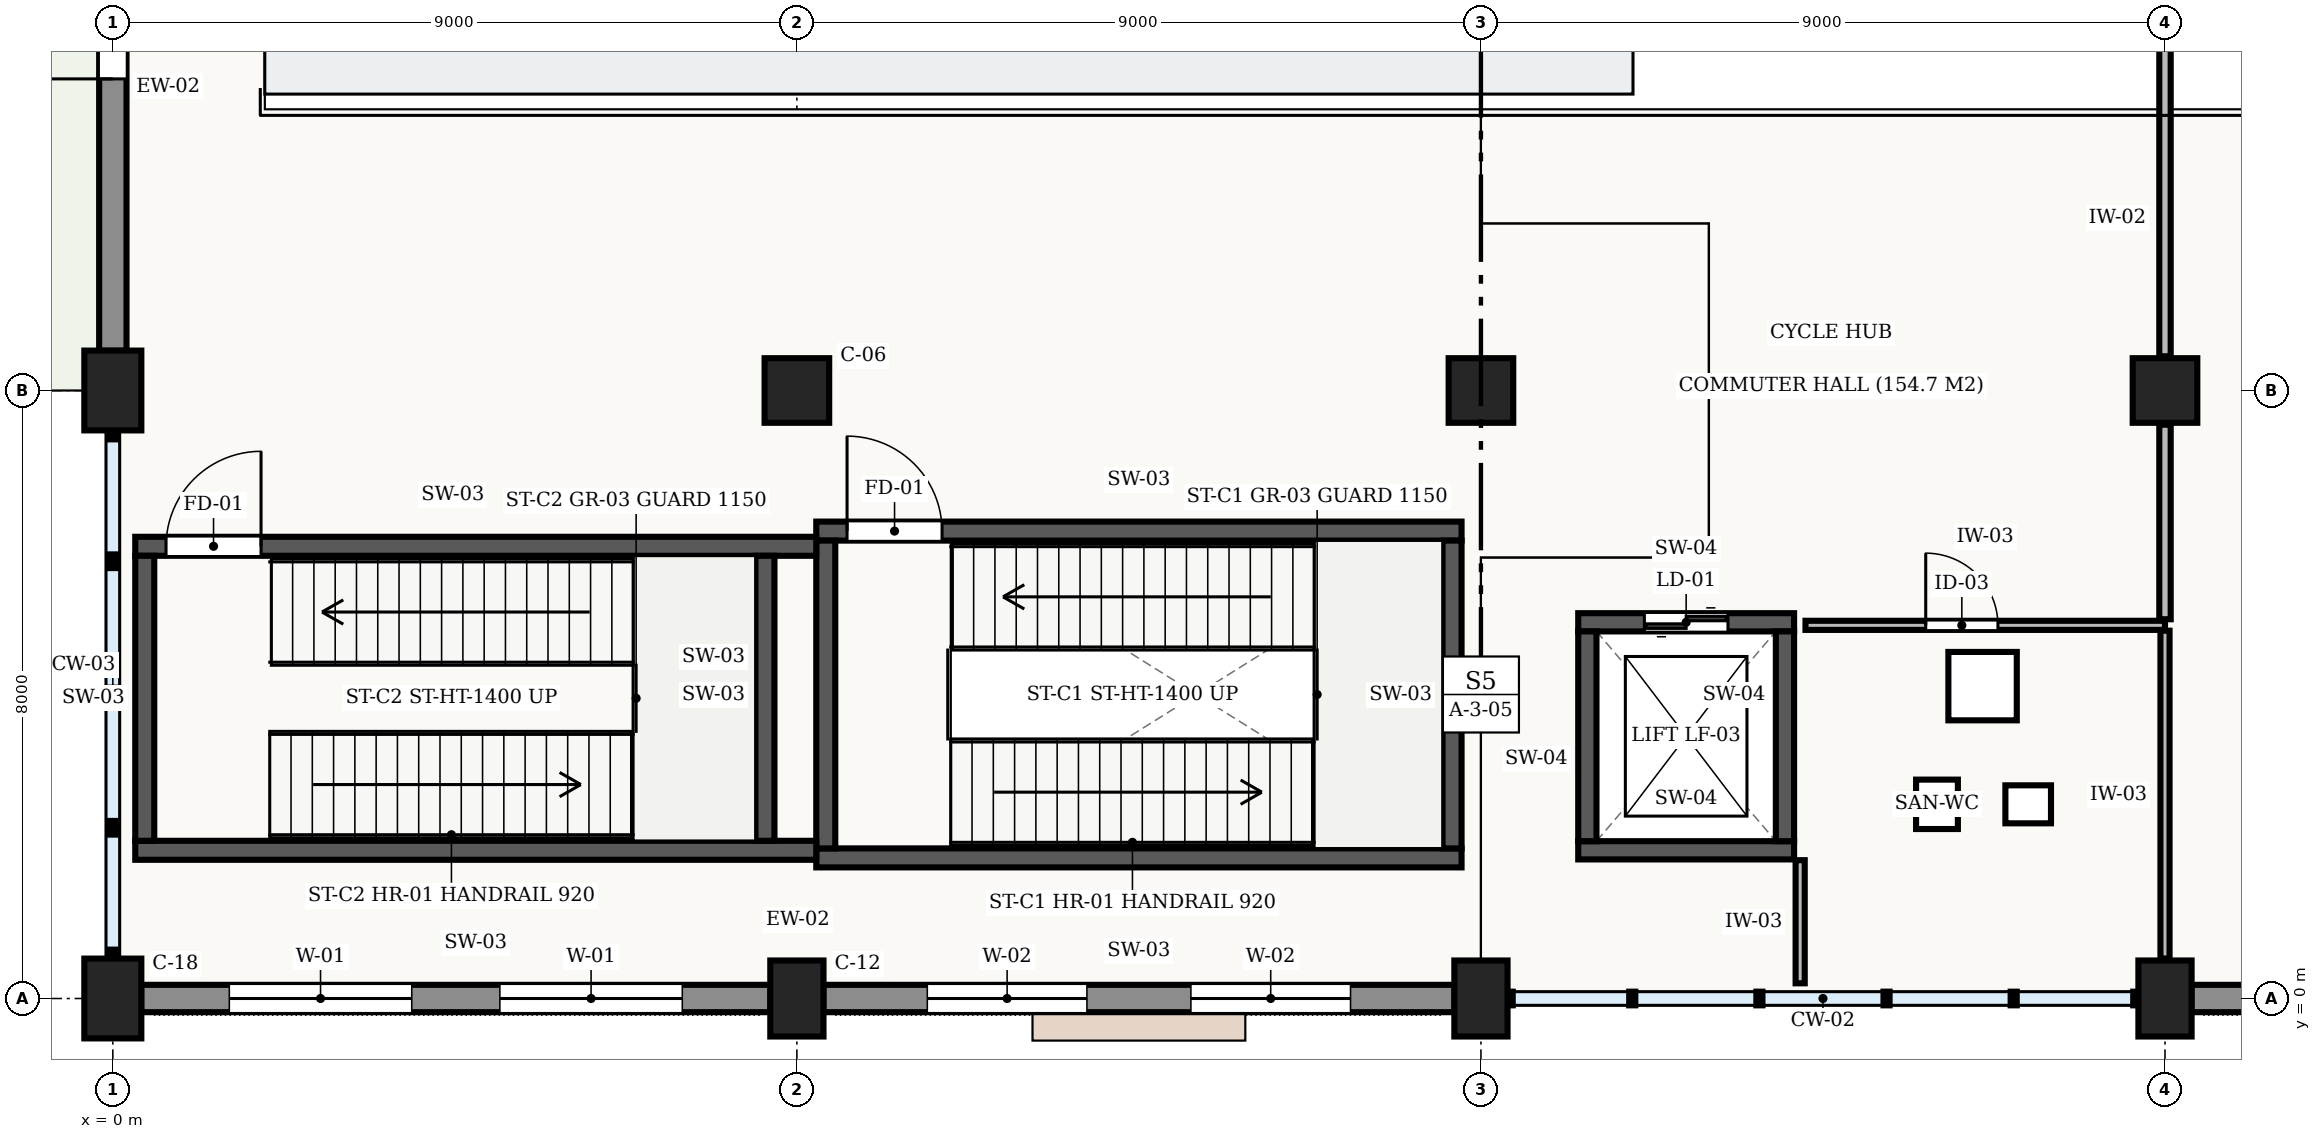
"""IFC4 building model, lengths in metres.
Left out: names, types, materials, properties, quantities, classifications, styles, units other than length and angle.
Written with IfcOpenShell. Run it as: python <this file> out.ifc"""

import sys

from ifc_helpers import new_model, si_unit, direction, frame, frame_2d, origin, origin_2d, place, context, subcontext, project, spatial, rectangle, extrude, element, fill, save


model = new_model("IFC4")
c1 = context("Model", 3, precision=1e-05, world=origin(), true_north=direction((0.0, 1.0)))
c2 = subcontext(c1, "Body", "Model", "MODEL_VIEW")
j1 = project(units=[si_unit("LENGTHUNIT", "METRE"), si_unit("PLANEANGLEUNIT", "RADIAN")], contexts=[c1])
p1 = place(None, origin())
s1 = spatial("IfcSite", under=j1, at=p1, CompositionType="ELEMENT")
p2 = place(p1, origin())
s2 = spatial("IfcBuilding", under=s1, at=p2, CompositionType="ELEMENT")
p3 = place(p2, origin())
s3 = spatial("IfcBuildingStorey", under=s2, at=p3, CompositionType="ELEMENT", Elevation=0.0)
for number, where, z_axis, x_axis in (
    (1, (0.0, 0.0, 0.0), (0.0, 0.0, 1.0), (1.0, 0.0, 0.0)),
    (2, (0.0, 8.0, 0.0), (0.0, 0.0, 1.0), (1.0, 0.0, 0.0)),
):
    element("IfcColumn", number, at=place(p3, frame(where, z_axis=z_axis, x_axis=x_axis)), inside=s3, PredefinedType="COLUMN", context=c2, shape_type="SweptSolid", body=[
        extrude(rectangle(XDim=0.75, YDim=1.05, at=origin_2d()), origin(), (0.0, 0.0, 1.0), 5.4),
    ])
p4 = place(p3, frame((9.0, 0.0, 0.0), z_axis=(0.0, 0.0, 1.0), x_axis=(1.0, 0.0, 0.0)))
e3 = element("IfcColumn", 3, at=p4, inside=s3, PredefinedType="COLUMN", context=c2, shape_type="SweptSolid", body=[
    extrude(rectangle(XDim=0.7, YDim=1.0, at=origin_2d()), origin(), (0.0, 0.0, 1.0), 5.4),
])
p5 = place(p3, frame((9.0, 8.0, 0.0), z_axis=(0.0, 0.0, 1.0), x_axis=(1.0, 0.0, 0.0)))
e4 = element("IfcColumn", 4, at=p5, inside=s3, PredefinedType="COLUMN", context=c2, shape_type="SweptSolid", body=[
    extrude(rectangle(XDim=0.85, YDim=0.85, at=origin_2d()), origin(), (0.0, 0.0, 1.0), 5.4),
])
p6 = place(p3, frame((18.0, 0.0, 0.0), z_axis=(0.0, 0.0, 1.0), x_axis=(1.0, 0.0, 0.0)))
e5 = element("IfcColumn", 5, at=p6, inside=s3, PredefinedType="COLUMN", context=c2, shape_type="SweptSolid", body=[
    extrude(rectangle(XDim=0.7, YDim=1.0, at=origin_2d()), origin(), (0.0, 0.0, 1.0), 5.4),
])
p7 = place(p3, frame((18.0, 8.0, 0.0), z_axis=(0.0, 0.0, 1.0), x_axis=(1.0, 0.0, 0.0)))
e6 = element("IfcColumn", 6, at=p7, inside=s3, PredefinedType="COLUMN", context=c2, shape_type="SweptSolid", body=[
    extrude(rectangle(XDim=0.85, YDim=0.85, at=origin_2d()), origin(), (0.0, 0.0, 1.0), 5.4),
])
p8 = place(p3, frame((27.0, 0.0, 0.0), z_axis=(0.0, 0.0, 1.0), x_axis=(1.0, 0.0, 0.0)))
e7 = element("IfcColumn", 7, at=p8, inside=s3, PredefinedType="COLUMN", context=c2, shape_type="SweptSolid", body=[
    extrude(rectangle(XDim=0.7, YDim=1.0, at=origin_2d()), origin(), (0.0, 0.0, 1.0), 5.4),
])
p9 = place(p3, frame((27.0, 8.0, 0.0), z_axis=(0.0, 0.0, 1.0), x_axis=(1.0, 0.0, 0.0)))
e8 = element("IfcColumn", 8, at=p9, inside=s3, PredefinedType="COLUMN", context=c2, shape_type="SweptSolid", body=[
    extrude(rectangle(XDim=0.85, YDim=0.85, at=origin_2d()), origin(), (0.0, 0.0, 1.0), 5.4),
])
p10 = place(p3, frame((35.652, 0.0, 0.0), z_axis=(0.0, 0.0, 1.0), x_axis=(-1.0, 0.0, 0.0)))
e9 = element("IfcWall", 9, at=p10, inside=s3, PredefinedType="STANDARD", context=c2, shape_type="SweptSolid", body=[
    extrude(rectangle(XDim=8.304, YDim=0.36, at=frame_2d((4.152, 0.0))), origin(), (0.0, 0.0, 1.0), 4.38),
])
p11 = place(p10, frame((1.368, 0.0, 0.9)))
e10 = element("IfcOpeningElement", 10, at=p11, cuts=e9, PredefinedType="OPENING", context=c2, shape_type="SweptSolid", body=[
    extrude(rectangle(XDim=2.1, YDim=3.0, at=frame_2d((1.05, 1.5))), frame((0.0, 0.192, 0.0), z_axis=(0.0, -1.0, 0.0), x_axis=(1.0, 0.0, 0.0)), (0.0, 0.0, 1.0), 0.384),
])
p12 = place(p10, frame((4.836, 0.0, 0.9)))
e11 = element("IfcOpeningElement", 11, at=p12, cuts=e9, PredefinedType="OPENING", context=c2, shape_type="SweptSolid", body=[
    extrude(rectangle(XDim=2.1, YDim=3.0, at=frame_2d((1.05, 1.5))), frame((0.0, 0.192, 0.0), z_axis=(0.0, -1.0, 0.0), x_axis=(1.0, 0.0, 0.0)), (0.0, 0.0, 1.0), 0.384),
])
p13 = place(p3, frame((17.652, 0.0, 0.0), z_axis=(0.0, 0.0, 1.0), x_axis=(-1.0, 0.0, 0.0)))
e12 = element("IfcWall", 12, at=p13, inside=s3, PredefinedType="STANDARD", context=c2, shape_type="SweptSolid", body=[
    extrude(rectangle(XDim=8.304, YDim=0.36, at=frame_2d((4.152, 0.0))), origin(), (0.0, 0.0, 1.0), 4.38),
])
p14 = place(p13, frame((1.368, 0.0, 0.9)))
e13 = element("IfcOpeningElement", 13, at=p14, cuts=e12, PredefinedType="OPENING", context=c2, shape_type="SweptSolid", body=[
    extrude(rectangle(XDim=2.1, YDim=3.0, at=frame_2d((1.05, 1.5))), frame((0.0, 0.192, 0.0), z_axis=(0.0, -1.0, 0.0), x_axis=(1.0, 0.0, 0.0)), (0.0, 0.0, 1.0), 0.384),
])
p15 = place(p13, frame((4.836, 0.0, 0.9)))
e14 = element("IfcOpeningElement", 14, at=p15, cuts=e12, PredefinedType="OPENING", context=c2, shape_type="SweptSolid", body=[
    extrude(rectangle(XDim=2.1, YDim=3.0, at=frame_2d((1.05, 1.5))), frame((0.0, 0.192, 0.0), z_axis=(0.0, -1.0, 0.0), x_axis=(1.0, 0.0, 0.0)), (0.0, 0.0, 1.0), 0.384),
])
p16 = place(p3, frame((8.652, 0.0, 0.0), z_axis=(0.0, 0.0, 1.0), x_axis=(-1.0, 0.0, 0.0)))
e15 = element("IfcWall", 15, at=p16, inside=s3, PredefinedType="STANDARD", context=c2, shape_type="SweptSolid", body=[
    extrude(rectangle(XDim=8.279, YDim=0.36, at=frame_2d((4.14, 0.0))), origin(), (0.0, 0.0, 1.0), 4.38),
])
p17 = place(p16, frame((1.16, 0.0, 0.9)))
e16 = element("IfcOpeningElement", 16, at=p17, cuts=e15, PredefinedType="OPENING", context=c2, shape_type="SweptSolid", body=[
    extrude(rectangle(XDim=2.4, YDim=3.2, at=frame_2d((1.2, 1.6))), frame((0.0, 0.192, 0.0), z_axis=(0.0, -1.0, 0.0), x_axis=(1.0, 0.0, 0.0)), (0.0, 0.0, 1.0), 0.384),
])
p18 = place(p16, frame((4.719, 0.0, 0.9)))
e17 = element("IfcOpeningElement", 17, at=p18, cuts=e15, PredefinedType="OPENING", context=c2, shape_type="SweptSolid", body=[
    extrude(rectangle(XDim=2.4, YDim=3.2, at=frame_2d((1.2, 1.6))), frame((0.0, 0.192, 0.0), z_axis=(0.0, -1.0, 0.0), x_axis=(1.0, 0.0, 0.0)), (0.0, 0.0, 1.0), 0.384),
])
p19 = place(p3, frame((0.0, 8.523, 0.0), z_axis=(0.0, 0.0, 1.0), x_axis=(0.0, 1.0, 0.0)))
e18 = element("IfcWall", 18, at=p19, inside=s3, PredefinedType="STANDARD", context=c2, shape_type="SweptSolid", body=[
    extrude(rectangle(XDim=6.954, YDim=0.36, at=frame_2d((3.477, 0.0))), origin(), (0.0, 0.0, 1.0), 4.38),
])
p20 = place(p19, frame((3.577, 0.0, 0.0)))
e19 = element("IfcOpeningElement", 19, at=p20, cuts=e18, PredefinedType="OPENING", context=c2, shape_type="SweptSolid", body=[
    extrude(rectangle(XDim=2.4, YDim=2.6, at=frame_2d((1.2, 1.3))), frame((0.0, 0.192, 0.0), z_axis=(0.0, -1.0, 0.0), x_axis=(1.0, 0.0, 0.0)), (0.0, 0.0, 1.0), 0.384),
])
p21 = place(p3, frame((9.255, 1.85, 0.0), z_axis=(0.0, 0.0, 1.0), x_axis=(1.0, 0.0, 0.0)))
e20 = element("IfcWall", 20, at=p21, inside=s3, PredefinedType="SHEAR", context=c2, shape_type="SweptSolid", body=[
    extrude(rectangle(XDim=8.49, YDim=0.25, at=frame_2d((4.245, 0.0))), origin(), (0.0, 0.0, 1.0), 5.05),
])
p22 = place(p3, frame((17.745, 6.15, 0.0), z_axis=(0.0, 0.0, 1.0), x_axis=(-1.0, 0.0, 0.0)))
e21 = element("IfcWall", 21, at=p22, inside=s3, PredefinedType="SHEAR", context=c2, shape_type="SweptSolid", body=[
    extrude(rectangle(XDim=8.49, YDim=0.25, at=frame_2d((4.245, 0.0))), origin(), (0.0, 0.0, 1.0), 5.05),
])
p23 = place(p22, frame((6.835, 0.0, 0.0)))
e22 = element("IfcOpeningElement", 22, at=p23, cuts=e21, PredefinedType="OPENING", context=c2, shape_type="SweptSolid", body=[
    extrude(rectangle(XDim=1.25, YDim=2.15, at=frame_2d((0.625, 1.075))), frame((0.0, 0.137, 0.0), z_axis=(0.0, -1.0, 0.0), x_axis=(1.0, 0.0, 0.0)), (0.0, 0.0, 1.0), 0.274),
])
for number, where, z_axis, x_axis in (
    (23, (9.38, 6.025, 0.0), (0.0, 0.0, 1.0), (0.0, -1.0, 0.0)),
    (24, (17.62, 1.975, 0.0), (0.0, 0.0, 1.0), (0.0, 1.0, 0.0)),
):
    element("IfcWall", number, at=place(p3, frame(where, z_axis=z_axis, x_axis=x_axis)), inside=s3, PredefinedType="SHEAR", context=c2, shape_type="SweptSolid", body=[
        extrude(rectangle(XDim=4.05, YDim=0.25, at=frame_2d((2.025, 0.0))), origin(), (0.0, 0.0, 1.0), 5.05),
    ])
p24 = place(p3, frame((0.295, 1.95, 0.0), z_axis=(0.0, 0.0, 1.0), x_axis=(1.0, 0.0, 0.0)))
e25 = element("IfcWall", 25, at=p24, inside=s3, PredefinedType="SHEAR", context=c2, shape_type="SweptSolid", body=[
    extrude(rectangle(XDim=8.96, YDim=0.25, at=frame_2d((4.48, 0.0))), origin(), (0.0, 0.0, 1.0), 5.05),
])
p25 = place(p3, frame((9.255, 5.95, 0.0), z_axis=(0.0, 0.0, 1.0), x_axis=(-1.0, 0.0, 0.0)))
e26 = element("IfcWall", 26, at=p25, inside=s3, PredefinedType="SHEAR", context=c2, shape_type="SweptSolid", body=[
    extrude(rectangle(XDim=8.96, YDim=0.25, at=frame_2d((4.48, 0.0))), origin(), (0.0, 0.0, 1.0), 5.05),
])
p26 = place(p25, frame((7.305, 0.0, 0.0)))
e27 = element("IfcOpeningElement", 27, at=p26, cuts=e26, PredefinedType="OPENING", context=c2, shape_type="SweptSolid", body=[
    extrude(rectangle(XDim=1.25, YDim=2.15, at=frame_2d((0.625, 1.075))), frame((0.0, 0.137, 0.0), z_axis=(0.0, -1.0, 0.0), x_axis=(1.0, 0.0, 0.0)), (0.0, 0.0, 1.0), 0.274),
])
for number, where, z_axis, x_axis in (
    (28, (0.42, 5.825, 0.0), (0.0, 0.0, 1.0), (0.0, -1.0, 0.0)),
    (29, (8.58, 2.075, 0.0), (0.0, 0.0, 1.0), (0.0, 1.0, 0.0)),
):
    element("IfcWall", number, at=place(p3, frame(where, z_axis=z_axis, x_axis=x_axis)), inside=s3, PredefinedType="SHEAR", context=c2, shape_type="SweptSolid", body=[
        extrude(rectangle(XDim=3.75, YDim=0.25, at=frame_2d((1.875, 0.0))), origin(), (0.0, 0.0, 1.0), 5.05),
    ])
p27 = place(p3, frame((19.28, 1.95, 0.0), z_axis=(0.0, 0.0, 1.0), x_axis=(1.0, 0.0, 0.0)))
e30 = element("IfcWall", 30, at=p27, inside=s3, PredefinedType="SHEAR", context=c2, shape_type="SweptSolid", body=[
    extrude(rectangle(XDim=2.84, YDim=0.24, at=frame_2d((1.42, 0.0))), origin(), (0.0, 0.0, 1.0), 5.05),
])
p28 = place(p3, frame((22.12, 4.95, 0.0), z_axis=(0.0, 0.0, 1.0), x_axis=(-1.0, 0.0, 0.0)))
e31 = element("IfcWall", 31, at=p28, inside=s3, PredefinedType="SHEAR", context=c2, shape_type="SweptSolid", body=[
    extrude(rectangle(XDim=2.84, YDim=0.24, at=frame_2d((1.42, 0.0))), origin(), (0.0, 0.0, 1.0), 5.05),
])
p29 = place(p28, frame((0.87, 0.0, 0.0)))
e32 = element("IfcOpeningElement", 32, at=p29, cuts=e31, PredefinedType="OPENING", context=c2, shape_type="SweptSolid", body=[
    extrude(rectangle(XDim=1.1, YDim=2.2, at=frame_2d((0.55, 1.1))), frame((0.0, 0.132, 0.0), z_axis=(0.0, -1.0, 0.0), x_axis=(1.0, 0.0, 0.0)), (0.0, 0.0, 1.0), 0.264),
])
for number, where, z_axis, x_axis in (
    (33, (19.4, 4.83, 0.0), (0.0, 0.0, 1.0), (0.0, -1.0, 0.0)),
    (34, (22.0, 2.07, 0.0), (0.0, 0.0, 1.0), (0.0, 1.0, 0.0)),
):
    element("IfcWall", number, at=place(p3, frame(where, z_axis=z_axis, x_axis=x_axis)), inside=s3, PredefinedType="SHEAR", context=c2, shape_type="SweptSolid", body=[
        extrude(rectangle(XDim=2.76, YDim=0.24, at=frame_2d((1.38, 0.0))), origin(), (0.0, 0.0, 1.0), 5.05),
    ])
p30 = place(p3, frame((22.27, 4.91, 0.0), z_axis=(0.0, 0.0, 1.0), x_axis=(1.0, 0.0, 0.0)))
e35 = element("IfcWall", 35, at=p30, inside=s3, PredefinedType="STANDARD", context=c2, shape_type="SweptSolid", body=[
    extrude(rectangle(XDim=4.73, YDim=0.12, at=frame_2d((2.365, 0.0))), origin(), (0.0, 0.0, 1.0), 5.05),
])
p31 = place(p30, frame((1.582, 0.0, 0.0)))
e36 = element("IfcOpeningElement", 36, at=p31, cuts=e35, PredefinedType="OPENING", context=c2, shape_type="SweptSolid", body=[
    extrude(rectangle(XDim=0.95, YDim=2.1, at=frame_2d((0.475, 1.05))), frame((0.0, 0.072, 0.0), z_axis=(0.0, -1.0, 0.0), x_axis=(1.0, 0.0, 0.0)), (0.0, 0.0, 1.0), 0.144),
])
p32 = place(p3, frame((22.2, 0.2, 0.0), z_axis=(0.0, 0.0, 1.0), x_axis=(0.0, 1.0, 0.0)))
e37 = element("IfcWall", 37, at=p32, inside=s3, PredefinedType="STANDARD", context=c2, shape_type="SweptSolid", body=[
    extrude(rectangle(XDim=1.62, YDim=0.12, at=frame_2d((0.81, 0.0))), origin(), (0.0, 0.0, 1.0), 5.05),
])
p33 = place(p3, frame((27.0, 0.525, 0.0), z_axis=(0.0, 0.0, 1.0), x_axis=(0.0, 1.0, 0.0)))
e38 = element("IfcWall", 38, at=p33, inside=s3, PredefinedType="STANDARD", context=c2, shape_type="SweptSolid", body=[
    extrude(rectangle(XDim=4.315, YDim=0.12, at=frame_2d((2.158, 0.0))), origin(), (0.0, 0.0, 1.0), 4.23),
])
p34 = place(p3, frame((27.0, 4.99, 0.0), z_axis=(0.0, 0.0, 1.0), x_axis=(0.0, 1.0, 0.0)))
e39 = element("IfcWall", 39, at=p34, inside=s3, PredefinedType="STANDARD", context=c2, shape_type="SweptSolid", body=[
    extrude(rectangle(XDim=2.56, YDim=0.15, at=frame_2d((1.28, 0.0))), origin(), (0.0, 0.0, 1.0), 4.23),
])
p35 = place(p3, frame((27.0, 8.45, 0.0), z_axis=(0.0, 0.0, 1.0), x_axis=(0.0, 1.0, 0.0)))
e40 = element("IfcWall", 40, at=p35, inside=s3, PredefinedType="STANDARD", context=c2, shape_type="SweptSolid", body=[
    extrude(rectangle(XDim=7.1, YDim=0.15, at=frame_2d((3.55, 0.0))), origin(), (0.0, 0.0, 1.0), 4.33),
])
p36 = place(p14, origin())
e41 = element("IfcWindow", 41, at=p36, inside=s3, PartitioningType="SINGLE_PANEL", PredefinedType="WINDOW", context=c2, shape_type="SweptSolid", body=[
    extrude(rectangle(XDim=2.1, YDim=3.0, at=frame_2d((1.05, 1.5))), frame((0.0, 0.03, 0.0), z_axis=(0.0, -1.0, 0.0), x_axis=(1.0, 0.0, 0.0)), (0.0, 0.0, 1.0), 0.06),
])
fill(e13, e41)
p37 = place(p15, origin())
e42 = element("IfcWindow", 42, at=p37, inside=s3, PartitioningType="SINGLE_PANEL", PredefinedType="WINDOW", context=c2, shape_type="SweptSolid", body=[
    extrude(rectangle(XDim=2.1, YDim=3.0, at=frame_2d((1.05, 1.5))), frame((0.0, 0.03, 0.0), z_axis=(0.0, -1.0, 0.0), x_axis=(1.0, 0.0, 0.0)), (0.0, 0.0, 1.0), 0.06),
])
fill(e14, e42)
p38 = place(p17, origin())
e43 = element("IfcWindow", 43, at=p38, inside=s3, PartitioningType="SINGLE_PANEL", PredefinedType="WINDOW", context=c2, shape_type="SweptSolid", body=[
    extrude(rectangle(XDim=2.4, YDim=3.2, at=frame_2d((1.2, 1.6))), frame((0.0, 0.03, 0.0), z_axis=(0.0, -1.0, 0.0), x_axis=(1.0, 0.0, 0.0)), (0.0, 0.0, 1.0), 0.06),
])
fill(e16, e43)
p39 = place(p18, origin())
e44 = element("IfcWindow", 44, at=p39, inside=s3, PartitioningType="SINGLE_PANEL", PredefinedType="WINDOW", context=c2, shape_type="SweptSolid", body=[
    extrude(rectangle(XDim=2.4, YDim=3.2, at=frame_2d((1.2, 1.6))), frame((0.0, 0.03, 0.0), z_axis=(0.0, -1.0, 0.0), x_axis=(1.0, 0.0, 0.0)), (0.0, 0.0, 1.0), 0.06),
])
fill(e17, e44)
p40 = place(p20, origin())
e45 = element("IfcDoor", 45, at=p40, inside=s3, OperationType="SINGLE_SWING_LEFT", PredefinedType="GATE", context=c2, shape_type="SweptSolid", body=[
    extrude(rectangle(XDim=2.4, YDim=2.6, at=frame_2d((1.2, 1.3))), frame((0.0, 0.025, 0.0), z_axis=(0.0, -1.0, 0.0), x_axis=(1.0, 0.0, 0.0)), (0.0, 0.0, 1.0), 0.05),
])
fill(e19, e45)
p41 = place(p23, frame((1.25, 0.0, 0.0), z_axis=(0.0, 0.0, 1.0), x_axis=(-1.0, 0.0, 0.0)))
e46 = element("IfcDoor", 46, at=p41, inside=s3, OperationType="SINGLE_SWING_LEFT", PredefinedType="DOOR", context=c2, shape_type="SweptSolid", body=[
    extrude(rectangle(XDim=1.25, YDim=2.15, at=frame_2d((0.625, 1.075))), frame((0.0, 0.025, 0.0), z_axis=(0.0, -1.0, 0.0), x_axis=(1.0, 0.0, 0.0)), (0.0, 0.0, 1.0), 0.05),
])
fill(e22, e46)
p42 = place(p26, frame((1.25, 0.0, 0.0), z_axis=(0.0, 0.0, 1.0), x_axis=(-1.0, 0.0, 0.0)))
e47 = element("IfcDoor", 47, at=p42, inside=s3, OperationType="SINGLE_SWING_RIGHT", PredefinedType="DOOR", context=c2, shape_type="SweptSolid", body=[
    extrude(rectangle(XDim=1.25, YDim=2.15, at=frame_2d((0.625, 1.075))), frame((0.0, 0.025, 0.0), z_axis=(0.0, -1.0, 0.0), x_axis=(1.0, 0.0, 0.0)), (0.0, 0.0, 1.0), 0.05),
])
fill(e27, e47)
p43 = place(p29, origin())
e48 = element("IfcDoor", 48, at=p43, inside=s3, OperationType="DOUBLE_DOOR_SLIDING", PredefinedType="DOOR", context=c2, shape_type="SweptSolid", body=[
    extrude(rectangle(XDim=1.1, YDim=2.2, at=frame_2d((0.55, 1.1))), frame((0.0, 0.025, 0.0), z_axis=(0.0, -1.0, 0.0), x_axis=(1.0, 0.0, 0.0)), (0.0, 0.0, 1.0), 0.05),
])
fill(e32, e48)
p44 = place(p31, origin())
e49 = element("IfcDoor", 49, at=p44, inside=s3, OperationType="SINGLE_SWING_LEFT", PredefinedType="DOOR", context=c2, shape_type="SweptSolid", body=[
    extrude(rectangle(XDim=0.95, YDim=2.1, at=frame_2d((0.475, 1.05))), frame((0.0, 0.025, 0.0), z_axis=(0.0, -1.0, 0.0), x_axis=(1.0, 0.0, 0.0)), (0.0, 0.0, 1.0), 0.05),
])
fill(e36, e49)
save(model, sys.argv[1])
